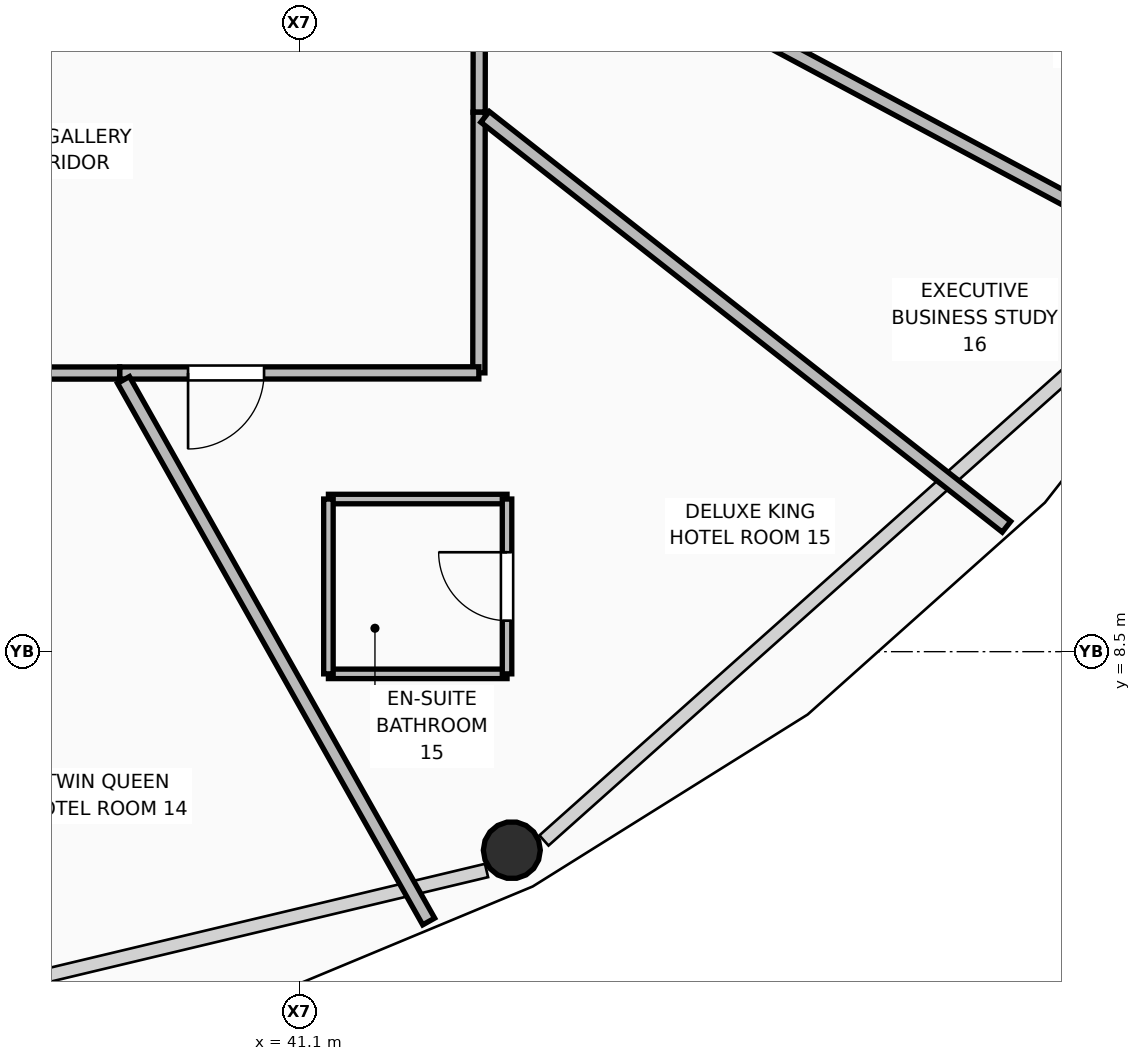
"""IFC4 building model, lengths in metres.
Left out: names, types, materials, properties, quantities, classifications, styles, units other than length and angle.
Written with IfcOpenShell. Run it as: python <this file> out.ifc"""

import sys

from ifc_helpers import new_model, si_unit, direction, frame, frame_2d, origin, origin_2d, place, context, subcontext, project, spatial, rectangle, hollow_circle, extrude, element, fill, save


model = new_model("IFC4")
c1 = context("Model", 3, precision=1e-05, world=origin(), true_north=direction((0.0, 1.0)))
c2 = subcontext(c1, "Body", "Model", "MODEL_VIEW")
j1 = project(units=[si_unit("LENGTHUNIT", "METRE"), si_unit("PLANEANGLEUNIT", "RADIAN")], contexts=[c1])
p1 = place(None, origin())
s1 = spatial("IfcSite", under=j1, at=p1, CompositionType="ELEMENT")
p2 = place(p1, origin())
s2 = spatial("IfcBuilding", under=s1, at=p2, CompositionType="ELEMENT")
p3 = place(p2, frame((0.0, 0.0, 153.45)))
s3 = spatial("IfcBuildingStorey", under=s2, at=p3, CompositionType="ELEMENT", Elevation=153.45)
p4 = place(p3, frame((43.892, 5.888, 0.0), z_axis=(0.0, 0.0, 1.0), x_axis=(1.0, 0.0, 0.0)))
e1 = element("IfcColumn", 1, at=p4, inside=s3, PredefinedType="COLUMN", context=c2, shape_type="SweptSolid", body=[
    extrude(hollow_circle(Radius=0.375, WallThickness=0.035, at=origin_2d()), origin(), (0.0, 0.0, 1.0), 3.57),
])
p5 = place(p3, frame((43.465, 17.96, 0.0), z_axis=(0.0, 0.0, 1.0), x_axis=(-0.001343112747, -0.999999098024, 0.0)))
e2 = element("IfcWall", 2, at=p5, inside=s3, PredefinedType="PARTITIONING", context=c2, shape_type="SweptSolid", body=[
    extrude(rectangle(XDim=2.363, YDim=0.16, at=frame_2d((1.182, 0.0))), origin(), (0.0, 0.0, 1.0), 3.006),
])
p6 = place(p5, frame((0.16, 0.0, 0.0)))
e3 = element("IfcOpeningElement", 3, at=p6, cuts=e2, PredefinedType="OPENING", context=c2, shape_type="SweptSolid", body=[
    extrude(rectangle(XDim=1.0, YDim=2.1, at=frame_2d((0.5, 1.05))), frame((0.0, 0.09, 0.0), z_axis=(0.0, -1.0, 0.0), x_axis=(1.0, 0.0, 0.0)), (0.0, 0.0, 1.0), 0.18),
])
p7 = place(p3, frame((43.462, 15.597, 0.0), z_axis=(0.0, 0.0, 1.0), x_axis=(-0.001139194704, -0.999999351118, 0.0)))
e4 = element("IfcWall", 4, at=p7, inside=s3, PredefinedType="PARTITIONING", context=c2, shape_type="SweptSolid", body=[
    extrude(rectangle(XDim=3.429, YDim=0.16, at=frame_2d((1.714, 0.0))), origin(), (0.0, 0.0, 1.0), 3.55),
])
p8 = place(p3, frame((43.458, 12.168, 0.0), z_axis=(0.0, 0.0, 1.0), x_axis=(-0.999999914606, -0.000413265798, 0.0)))
e5 = element("IfcWall", 5, at=p8, inside=s3, PredefinedType="PARTITIONING", context=c2, shape_type="SweptSolid", body=[
    extrude(rectangle(XDim=4.726, YDim=0.16, at=frame_2d((2.363, 0.0))), origin(), (0.0, 0.0, 1.0), 3.006),
])
p9 = place(p8, frame((2.826, 0.0, 0.0)))
e6 = element("IfcOpeningElement", 6, at=p9, cuts=e5, PredefinedType="OPENING", context=c2, shape_type="SweptSolid", body=[
    extrude(rectangle(XDim=1.0, YDim=2.1, at=frame_2d((0.5, 1.05))), frame((0.0, 0.09, 0.0), z_axis=(0.0, -1.0, 0.0), x_axis=(1.0, 0.0, 0.0)), (0.0, 0.0, 1.0), 0.18),
])
p10 = place(p3, frame((38.732, 12.166, 0.0), z_axis=(0.0, 0.0, 1.0), x_axis=(-0.999999889749, -0.000469575374, 0.0)))
e7 = element("IfcWall", 7, at=p10, inside=s3, PredefinedType="PARTITIONING", context=c2, shape_type="SweptSolid", body=[
    extrude(rectangle(XDim=6.239, YDim=0.16, at=frame_2d((3.12, 0.0))), origin(), (0.0, 0.0, 1.0), 3.55),
])
p11 = place(p10, frame((2.545, 0.0, 0.0)))
e8 = element("IfcOpeningElement", 8, at=p11, cuts=e7, PredefinedType="OPENING", context=c2, shape_type="SweptSolid", body=[
    extrude(rectangle(XDim=1.0, YDim=2.1, at=frame_2d((0.5, 1.05))), frame((0.0, 0.09, 0.0), z_axis=(0.0, -1.0, 0.0), x_axis=(1.0, 0.0, 0.0)), (0.0, 0.0, 1.0), 0.18),
])
p12 = place(p3, frame((38.783, 12.075, 0.0), z_axis=(0.0, 0.0, 1.0), x_axis=(0.490941390618, -0.871192602688, 0.0)))
e9 = element("IfcWall", 9, at=p12, inside=s3, PredefinedType="PARTITIONING", context=c2, shape_type="SweptSolid", body=[
    extrude(rectangle(XDim=8.178, YDim=0.18, at=frame_2d((4.089, 0.0))), origin(), (0.0, 0.0, 1.0), 2.852),
])
p13 = place(p3, frame((43.54, 15.536, 0.0), z_axis=(0.0, 0.0, 1.0), x_axis=(0.786155203297, -0.618029122558, 0.0)))
e10 = element("IfcWall", 10, at=p13, inside=s3, PredefinedType="PARTITIONING", context=c2, shape_type="SweptSolid", body=[
    extrude(rectangle(XDim=8.726, YDim=0.18, at=frame_2d((4.363, 0.0))), origin(), (0.0, 0.0, 1.0), 2.852),
])
p14 = place(p3, frame((44.779, 17.885, 0.0), z_axis=(0.0, 0.0, 1.0), x_axis=(0.881472668275, -0.472235042202, 0.0)))
e11 = element("IfcWall", 11, at=p14, inside=s3, PredefinedType="PARTITIONING", context=c2, shape_type="SweptSolid", body=[
    extrude(rectangle(XDim=9.444, YDim=0.18, at=frame_2d((4.722, 0.0))), origin(), (0.0, 0.0, 1.0), 2.852),
])
for number, where, z_axis, x_axis in (
    (12, (41.479, 8.208, 0.0), (0.0, 0.0, 1.0), (1.0, 0.0, 0.0)),
    (13, (41.479, 10.508, 0.0), (0.0, 0.0, 1.0), (1.0, 0.0, 0.0)),
):
    element("IfcWall", number, at=place(p3, frame(where, z_axis=z_axis, x_axis=x_axis)), inside=s3, PredefinedType="PARTITIONING", context=c2, shape_type="SweptSolid", body=[
        extrude(rectangle(XDim=2.35, YDim=0.125, at=frame_2d((1.175, 0.0))), origin(), (0.0, 0.0, 1.0), 3.006),
    ])
p15 = place(p3, frame((41.479, 8.208, 0.0), z_axis=(0.0, 0.0, 1.0), x_axis=(0.0, 1.0, 0.0)))
e14 = element("IfcWall", 14, at=p15, inside=s3, PredefinedType="PARTITIONING", context=c2, shape_type="SweptSolid", body=[
    extrude(rectangle(XDim=2.3, YDim=0.125, at=frame_2d((1.15, 0.0))), origin(), (0.0, 0.0, 1.0), 3.55),
])
p16 = place(p3, frame((43.829, 8.208, 0.0), z_axis=(0.0, 0.0, 1.0), x_axis=(0.0, 1.0, 0.0)))
e15 = element("IfcWall", 15, at=p16, inside=s3, PredefinedType="PARTITIONING", context=c2, shape_type="SweptSolid", body=[
    extrude(rectangle(XDim=2.3, YDim=0.125, at=frame_2d((1.15, 0.0))), origin(), (0.0, 0.0, 1.0), 3.55),
])
p17 = place(p16, frame((0.7, 0.0, 0.0)))
e16 = element("IfcOpeningElement", 16, at=p17, cuts=e15, PredefinedType="OPENING", context=c2, shape_type="SweptSolid", body=[
    extrude(rectangle(XDim=0.9, YDim=2.1, at=frame_2d((0.45, 1.05))), frame((0.0, 0.073, 0.0), z_axis=(0.0, -1.0, 0.0), x_axis=(1.0, 0.0, 0.0)), (0.0, 0.0, 1.0), 0.145),
])
p18 = place(p17, origin())
e17 = element("IfcDoor", 17, at=p18, inside=s3, OperationType="SINGLE_SWING_RIGHT", PredefinedType="DOOR", context=c2, shape_type="SweptSolid", body=[
    extrude(rectangle(XDim=0.9, YDim=2.1, at=frame_2d((0.45, 1.05))), frame((0.0, 0.025, 0.0), z_axis=(0.0, -1.0, 0.0), x_axis=(1.0, 0.0, 0.0)), (0.0, 0.0, 1.0), 0.05),
])
fill(e16, e17)
p19 = place(p9, origin())
e18 = element("IfcDoor", 18, at=p19, inside=s3, OperationType="SINGLE_SWING_RIGHT", PredefinedType="DOOR", context=c2, shape_type="SweptSolid", body=[
    extrude(rectangle(XDim=1.0, YDim=2.1, at=frame_2d((0.5, 1.05))), frame((0.0, 0.025, 0.0), z_axis=(0.0, -1.0, 0.0), x_axis=(1.0, 0.0, 0.0)), (0.0, 0.0, 1.0), 0.05),
])
fill(e6, e18)
save(model, sys.argv[1])
